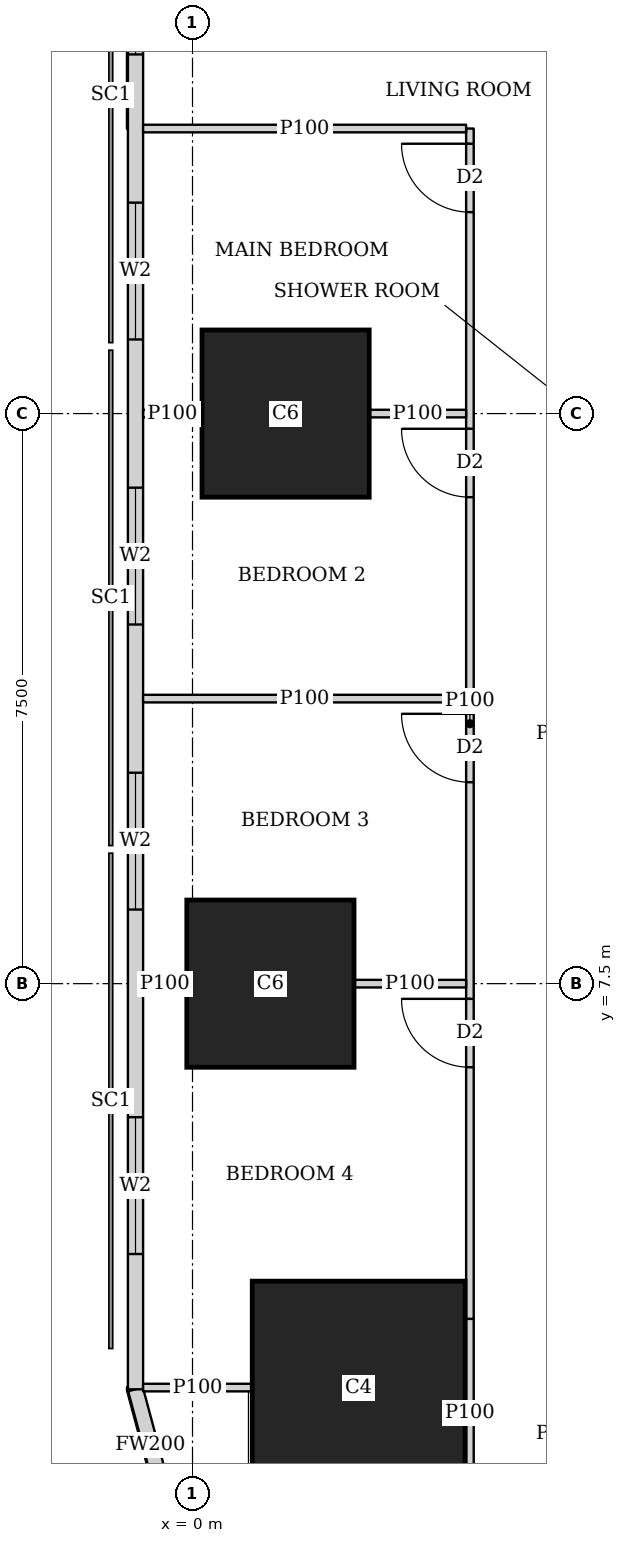
"""IFC4 building model, lengths in metres.
Left out: names, types, materials, properties, quantities, classifications, styles, units other than length and angle.
Written with IfcOpenShell. Run it as: python <this file> out.ifc"""

import sys

from ifc_helpers import new_model, si_unit, direction, frame, frame_2d, origin, origin_2d, place, context, subcontext, project, spatial, rectangle, extrude, element, fill, save


model = new_model("IFC4")
c1 = context("Model", 3, precision=1e-05, world=origin(), true_north=direction((0.0, 1.0)))
c2 = subcontext(c1, "Body", "Model", "MODEL_VIEW")
j1 = project(units=[si_unit("LENGTHUNIT", "METRE"), si_unit("PLANEANGLEUNIT", "RADIAN")], contexts=[c1])
p1 = place(None, origin())
s1 = spatial("IfcSite", under=j1, at=p1, CompositionType="ELEMENT")
p2 = place(p1, origin())
s2 = spatial("IfcBuilding", under=s1, at=p2, CompositionType="ELEMENT")
p3 = place(p2, frame((0.0, 0.0, 81.65)))
s3 = spatial("IfcBuildingStorey", under=s2, at=p3, CompositionType="ELEMENT", Elevation=81.65)
p4 = place(p3, frame((2.186, 2.186, 0.0), z_axis=(0.0, 0.0, 1.0), x_axis=(1.0, 0.0, 0.0)))
e1 = element("IfcColumn", 1, at=p4, inside=s3, PredefinedType="COLUMN", context=c2, shape_type="SweptSolid", body=[
    extrude(rectangle(XDim=2.8, YDim=2.8, at=origin_2d()), origin(), (0.0, 0.0, 1.0), 3.75),
])
for number, where, z_axis, x_axis in (
    (2, (1.025, 7.5, 0.0), (0.0, 0.0, 1.0), (1.0, 0.0, 0.0)),
    (3, (1.225, 15.0, 0.0), (0.0, 0.0, 1.0), (1.0, 0.0, 0.0)),
):
    element("IfcColumn", number, at=place(p3, frame(where, z_axis=z_axis, x_axis=x_axis)), inside=s3, PredefinedType="COLUMN", context=c2, shape_type="SweptSolid", body=[
        extrude(rectangle(XDim=2.2, YDim=2.2, at=origin_2d()), origin(), (0.0, 0.0, 1.0), 3.75),
    ])
p5 = place(p3, frame((-0.75, 42.837, 0.0), z_axis=(0.0, 0.0, 1.0), x_axis=(0.0, -1.0, 0.0)))
e4 = element("IfcWall", 4, at=p5, inside=s3, PredefinedType="SOLIDWALL", context=c2, shape_type="SweptSolid", body=[
    extrude(rectangle(XDim=40.674, YDim=0.2, at=frame_2d((20.337, 0.0))), origin(), (0.0, 0.0, 1.0), 3.5),
])
p6 = place(p5, frame((1.78, 0.0, 0.9)))
e5 = element("IfcOpeningElement", 5, at=p6, cuts=e4, PredefinedType="OPENING", context=c2, shape_type="SweptSolid", body=[
    extrude(rectangle(XDim=1.8, YDim=1.5, at=frame_2d((0.9, 0.75))), frame((0.0, 0.11, 0.0), z_axis=(0.0, -1.0, 0.0), x_axis=(1.0, 0.0, 0.0)), (0.0, 0.0, 1.0), 0.22),
])
p7 = place(p5, frame((6.312, 0.0, 0.9)))
e6 = element("IfcOpeningElement", 6, at=p7, cuts=e4, PredefinedType="OPENING", context=c2, shape_type="SweptSolid", body=[
    extrude(rectangle(XDim=1.8, YDim=1.5, at=frame_2d((0.9, 0.75))), frame((0.0, 0.11, 0.0), z_axis=(0.0, -1.0, 0.0), x_axis=(1.0, 0.0, 0.0)), (0.0, 0.0, 1.0), 0.22),
])
p8 = place(p5, frame((10.062, 0.0, 0.9)))
e7 = element("IfcOpeningElement", 7, at=p8, cuts=e4, PredefinedType="OPENING", context=c2, shape_type="SweptSolid", body=[
    extrude(rectangle(XDim=1.8, YDim=1.5, at=frame_2d((0.9, 0.75))), frame((0.0, 0.11, 0.0), z_axis=(0.0, -1.0, 0.0), x_axis=(1.0, 0.0, 0.0)), (0.0, 0.0, 1.0), 0.22),
])
p9 = place(p5, frame((13.812, 0.0, 0.9)))
e8 = element("IfcOpeningElement", 8, at=p9, cuts=e4, PredefinedType="OPENING", context=c2, shape_type="SweptSolid", body=[
    extrude(rectangle(XDim=1.8, YDim=1.5, at=frame_2d((0.9, 0.75))), frame((0.0, 0.11, 0.0), z_axis=(0.0, -1.0, 0.0), x_axis=(1.0, 0.0, 0.0)), (0.0, 0.0, 1.0), 0.22),
])
p10 = place(p5, frame((17.562, 0.0, 0.9)))
e9 = element("IfcOpeningElement", 9, at=p10, cuts=e4, PredefinedType="OPENING", context=c2, shape_type="SweptSolid", body=[
    extrude(rectangle(XDim=1.8, YDim=1.5, at=frame_2d((0.9, 0.75))), frame((0.0, 0.11, 0.0), z_axis=(0.0, -1.0, 0.0), x_axis=(1.0, 0.0, 0.0)), (0.0, 0.0, 1.0), 0.22),
])
p11 = place(p5, frame((21.312, 0.0, 0.9)))
e10 = element("IfcOpeningElement", 10, at=p11, cuts=e4, PredefinedType="OPENING", context=c2, shape_type="SweptSolid", body=[
    extrude(rectangle(XDim=1.8, YDim=1.5, at=frame_2d((0.9, 0.75))), frame((0.0, 0.11, 0.0), z_axis=(0.0, -1.0, 0.0), x_axis=(1.0, 0.0, 0.0)), (0.0, 0.0, 1.0), 0.22),
])
p12 = place(p5, frame((25.062, 0.0, 0.9)))
e11 = element("IfcOpeningElement", 11, at=p12, cuts=e4, PredefinedType="OPENING", context=c2, shape_type="SweptSolid", body=[
    extrude(rectangle(XDim=1.8, YDim=1.5, at=frame_2d((0.9, 0.75))), frame((0.0, 0.11, 0.0), z_axis=(0.0, -1.0, 0.0), x_axis=(1.0, 0.0, 0.0)), (0.0, 0.0, 1.0), 0.22),
])
p13 = place(p5, frame((28.812, 0.0, 0.9)))
e12 = element("IfcOpeningElement", 12, at=p13, cuts=e4, PredefinedType="OPENING", context=c2, shape_type="SweptSolid", body=[
    extrude(rectangle(XDim=1.8, YDim=1.5, at=frame_2d((0.9, 0.75))), frame((0.0, 0.11, 0.0), z_axis=(0.0, -1.0, 0.0), x_axis=(1.0, 0.0, 0.0)), (0.0, 0.0, 1.0), 0.22),
])
p14 = place(p5, frame((32.562, 0.0, 0.9)))
e13 = element("IfcOpeningElement", 13, at=p14, cuts=e4, PredefinedType="OPENING", context=c2, shape_type="SweptSolid", body=[
    extrude(rectangle(XDim=1.8, YDim=1.5, at=frame_2d((0.9, 0.75))), frame((0.0, 0.11, 0.0), z_axis=(0.0, -1.0, 0.0), x_axis=(1.0, 0.0, 0.0)), (0.0, 0.0, 1.0), 0.22),
])
p15 = place(p5, frame((37.094, 0.0, 0.9)))
e14 = element("IfcOpeningElement", 14, at=p15, cuts=e4, PredefinedType="OPENING", context=c2, shape_type="SweptSolid", body=[
    extrude(rectangle(XDim=1.8, YDim=1.5, at=frame_2d((0.9, 0.75))), frame((0.0, 0.11, 0.0), z_axis=(0.0, -1.0, 0.0), x_axis=(1.0, 0.0, 0.0)), (0.0, 0.0, 1.0), 0.22),
])
p16 = place(p3, frame((-0.75, 2.163, 0.0), z_axis=(0.0, 0.0, 1.0), x_axis=(0.259168954497, -0.965832000415, 0.0)))
e15 = element("IfcWall", 15, at=p16, inside=s3, PredefinedType="SOLIDWALL", context=c2, shape_type="SweptSolid", body=[
    extrude(rectangle(XDim=1.513, YDim=0.2, at=frame_2d((0.756, 0.0))), origin(), (0.0, 0.0, 1.0), 3.5),
])
p17 = place(p3, frame((3.65, 0.604, 0.0), z_axis=(0.0, 0.0, 1.0), x_axis=(0.0, 1.0, 0.0)))
e16 = element("IfcWall", 16, at=p17, inside=s3, PredefinedType="PARTITIONING", context=c2, shape_type="SweptSolid", body=[
    extrude(rectangle(XDim=2.486, YDim=0.1, at=frame_2d((1.243, 0.0))), origin(), (0.0, 0.0, 1.0), 2.05),
])
p18 = place(p3, frame((3.65, 3.09, 0.0), z_axis=(0.0, 0.0, 1.0), x_axis=(0.0, 1.0, 0.0)))
e17 = element("IfcWall", 17, at=p18, inside=s3, PredefinedType="PARTITIONING", context=c2, shape_type="SweptSolid", body=[
    extrude(rectangle(XDim=15.66, YDim=0.1, at=frame_2d((7.83, 0.0))), origin(), (0.0, 0.0, 1.0), 3.5),
])
p19 = place(p18, frame((14.56, 0.0, 0.0)))
e18 = element("IfcOpeningElement", 18, at=p19, cuts=e17, PredefinedType="OPENING", context=c2, shape_type="SweptSolid", body=[
    extrude(rectangle(XDim=0.9, YDim=2.1, at=frame_2d((0.45, 1.05))), frame((0.0, 0.06, 0.0), z_axis=(0.0, -1.0, 0.0), x_axis=(1.0, 0.0, 0.0)), (0.0, 0.0, 1.0), 0.12),
])
p20 = place(p18, frame((10.81, 0.0, 0.0)))
e19 = element("IfcOpeningElement", 19, at=p20, cuts=e17, PredefinedType="OPENING", context=c2, shape_type="SweptSolid", body=[
    extrude(rectangle(XDim=0.9, YDim=2.1, at=frame_2d((0.45, 1.05))), frame((0.0, 0.06, 0.0), z_axis=(0.0, -1.0, 0.0), x_axis=(1.0, 0.0, 0.0)), (0.0, 0.0, 1.0), 0.12),
])
p21 = place(p18, frame((7.06, 0.0, 0.0)))
e20 = element("IfcOpeningElement", 20, at=p21, cuts=e17, PredefinedType="OPENING", context=c2, shape_type="SweptSolid", body=[
    extrude(rectangle(XDim=0.9, YDim=2.1, at=frame_2d((0.45, 1.05))), frame((0.0, 0.06, 0.0), z_axis=(0.0, -1.0, 0.0), x_axis=(1.0, 0.0, 0.0)), (0.0, 0.0, 1.0), 0.12),
])
p22 = place(p18, frame((3.31, 0.0, 0.0)))
e21 = element("IfcOpeningElement", 21, at=p22, cuts=e17, PredefinedType="OPENING", context=c2, shape_type="SweptSolid", body=[
    extrude(rectangle(XDim=0.9, YDim=2.1, at=frame_2d((0.45, 1.05))), frame((0.0, 0.06, 0.0), z_axis=(0.0, -1.0, 0.0), x_axis=(1.0, 0.0, 0.0)), (0.0, 0.0, 1.0), 0.12),
])
p23 = place(p3, frame((-0.65, 2.186, 0.0), z_axis=(0.0, 0.0, 1.0), x_axis=(1.0, 0.0, 0.0)))
e22 = element("IfcWall", 22, at=p23, inside=s3, PredefinedType="PARTITIONING", context=c2, shape_type="SweptSolid", body=[
    extrude(rectangle(XDim=1.435, YDim=0.1, at=frame_2d((0.717, 0.0))), origin(), (0.0, 0.0, 1.0), 3.5),
])
p24 = place(p3, frame((-0.65, 7.5, 0.0), z_axis=(0.0, 0.0, 1.0), x_axis=(1.0, 0.0, 0.0)))
e23 = element("IfcWall", 23, at=p24, inside=s3, PredefinedType="PARTITIONING", context=c2, shape_type="SweptSolid", body=[
    extrude(rectangle(XDim=0.574, YDim=0.1, at=frame_2d((0.287, 0.0))), origin(), (0.0, 0.0, 1.0), 2.05),
])
p25 = place(p3, frame((2.126, 7.5, 0.0), z_axis=(0.0, 0.0, 1.0), x_axis=(1.0, 0.0, 0.0)))
e24 = element("IfcWall", 24, at=p25, inside=s3, PredefinedType="PARTITIONING", context=c2, shape_type="SweptSolid", body=[
    extrude(rectangle(XDim=1.474, YDim=0.1, at=frame_2d((0.737, 0.0))), origin(), (0.0, 0.0, 1.0), 2.05),
])
p26 = place(p3, frame((-0.65, 11.25, 0.0), z_axis=(0.0, 0.0, 1.0), x_axis=(1.0, 0.0, 0.0)))
e25 = element("IfcWall", 25, at=p26, inside=s3, PredefinedType="PARTITIONING", context=c2, shape_type="SweptSolid", body=[
    extrude(rectangle(XDim=4.25, YDim=0.1, at=frame_2d((2.125, 0.0))), origin(), (0.0, 0.0, 1.0), 2.2),
])
p27 = place(p3, frame((-0.65, 15.0, 0.0), z_axis=(0.0, 0.0, 1.0), x_axis=(1.0, 0.0, 0.0)))
e26 = element("IfcWall", 26, at=p27, inside=s3, PredefinedType="PARTITIONING", context=c2, shape_type="SweptSolid", body=[
    extrude(rectangle(XDim=0.774, YDim=0.1, at=frame_2d((0.387, 0.0))), origin(), (0.0, 0.0, 1.0), 3.5),
])
p28 = place(p3, frame((2.326, 15.0, 0.0), z_axis=(0.0, 0.0, 1.0), x_axis=(1.0, 0.0, 0.0)))
e27 = element("IfcWall", 27, at=p28, inside=s3, PredefinedType="PARTITIONING", context=c2, shape_type="SweptSolid", body=[
    extrude(rectangle(XDim=1.274, YDim=0.1, at=frame_2d((0.637, 0.0))), origin(), (0.0, 0.0, 1.0), 3.5),
])
p29 = place(p3, frame((-0.65, 18.75, 0.0), z_axis=(0.0, 0.0, 1.0), x_axis=(1.0, 0.0, 0.0)))
e28 = element("IfcWall", 28, at=p29, inside=s3, PredefinedType="PARTITIONING", context=c2, shape_type="SweptSolid", body=[
    extrude(rectangle(XDim=4.25, YDim=0.1, at=frame_2d((2.125, 0.0))), origin(), (0.0, 0.0, 1.0), 2.2),
])
p30 = place(p11, origin())
e29 = element("IfcWindow", 29, at=p30, inside=s3, PartitioningType="SINGLE_PANEL", PredefinedType="WINDOW", context=c2, shape_type="SweptSolid", body=[
    extrude(rectangle(XDim=1.8, YDim=1.5, at=frame_2d((0.9, 0.75))), frame((0.0, 0.03, 0.0), z_axis=(0.0, -1.0, 0.0), x_axis=(1.0, 0.0, 0.0)), (0.0, 0.0, 1.0), 0.06),
])
fill(e10, e29)
p31 = place(p12, origin())
e30 = element("IfcWindow", 30, at=p31, inside=s3, PartitioningType="SINGLE_PANEL", PredefinedType="WINDOW", context=c2, shape_type="SweptSolid", body=[
    extrude(rectangle(XDim=1.8, YDim=1.5, at=frame_2d((0.9, 0.75))), frame((0.0, 0.03, 0.0), z_axis=(0.0, -1.0, 0.0), x_axis=(1.0, 0.0, 0.0)), (0.0, 0.0, 1.0), 0.06),
])
fill(e11, e30)
p32 = place(p13, origin())
e31 = element("IfcWindow", 31, at=p32, inside=s3, PartitioningType="SINGLE_PANEL", PredefinedType="WINDOW", context=c2, shape_type="SweptSolid", body=[
    extrude(rectangle(XDim=1.8, YDim=1.5, at=frame_2d((0.9, 0.75))), frame((0.0, 0.03, 0.0), z_axis=(0.0, -1.0, 0.0), x_axis=(1.0, 0.0, 0.0)), (0.0, 0.0, 1.0), 0.06),
])
fill(e12, e31)
p33 = place(p14, origin())
e32 = element("IfcWindow", 32, at=p33, inside=s3, PartitioningType="SINGLE_PANEL", PredefinedType="WINDOW", context=c2, shape_type="SweptSolid", body=[
    extrude(rectangle(XDim=1.8, YDim=1.5, at=frame_2d((0.9, 0.75))), frame((0.0, 0.03, 0.0), z_axis=(0.0, -1.0, 0.0), x_axis=(1.0, 0.0, 0.0)), (0.0, 0.0, 1.0), 0.06),
])
fill(e13, e32)
p34 = place(p15, origin())
e33 = element("IfcWindow", 33, at=p34, inside=s3, PartitioningType="SINGLE_PANEL", PredefinedType="WINDOW", context=c2, shape_type="SweptSolid", body=[
    extrude(rectangle(XDim=1.8, YDim=1.5, at=frame_2d((0.9, 0.75))), frame((0.0, 0.03, 0.0), z_axis=(0.0, -1.0, 0.0), x_axis=(1.0, 0.0, 0.0)), (0.0, 0.0, 1.0), 0.06),
])
fill(e14, e33)
p35 = place(p19, origin())
e34 = element("IfcDoor", 34, at=p35, inside=s3, OperationType="SINGLE_SWING_RIGHT", PredefinedType="DOOR", context=c2, shape_type="SweptSolid", body=[
    extrude(rectangle(XDim=0.9, YDim=2.1, at=frame_2d((0.45, 1.05))), frame((0.0, 0.025, 0.0), z_axis=(0.0, -1.0, 0.0), x_axis=(1.0, 0.0, 0.0)), (0.0, 0.0, 1.0), 0.05),
])
fill(e18, e34)
p36 = place(p20, origin())
e35 = element("IfcDoor", 35, at=p36, inside=s3, OperationType="SINGLE_SWING_RIGHT", PredefinedType="DOOR", context=c2, shape_type="SweptSolid", body=[
    extrude(rectangle(XDim=0.9, YDim=2.1, at=frame_2d((0.45, 1.05))), frame((0.0, 0.025, 0.0), z_axis=(0.0, -1.0, 0.0), x_axis=(1.0, 0.0, 0.0)), (0.0, 0.0, 1.0), 0.05),
])
fill(e19, e35)
p37 = place(p21, origin())
e36 = element("IfcDoor", 36, at=p37, inside=s3, OperationType="SINGLE_SWING_RIGHT", PredefinedType="DOOR", context=c2, shape_type="SweptSolid", body=[
    extrude(rectangle(XDim=0.9, YDim=2.1, at=frame_2d((0.45, 1.05))), frame((0.0, 0.025, 0.0), z_axis=(0.0, -1.0, 0.0), x_axis=(1.0, 0.0, 0.0)), (0.0, 0.0, 1.0), 0.05),
])
fill(e20, e36)
p38 = place(p22, origin())
e37 = element("IfcDoor", 37, at=p38, inside=s3, OperationType="SINGLE_SWING_RIGHT", PredefinedType="DOOR", context=c2, shape_type="SweptSolid", body=[
    extrude(rectangle(XDim=0.9, YDim=2.1, at=frame_2d((0.45, 1.05))), frame((0.0, 0.025, 0.0), z_axis=(0.0, -1.0, 0.0), x_axis=(1.0, 0.0, 0.0)), (0.0, 0.0, 1.0), 0.05),
])
fill(e21, e37)
save(model, sys.argv[1])
